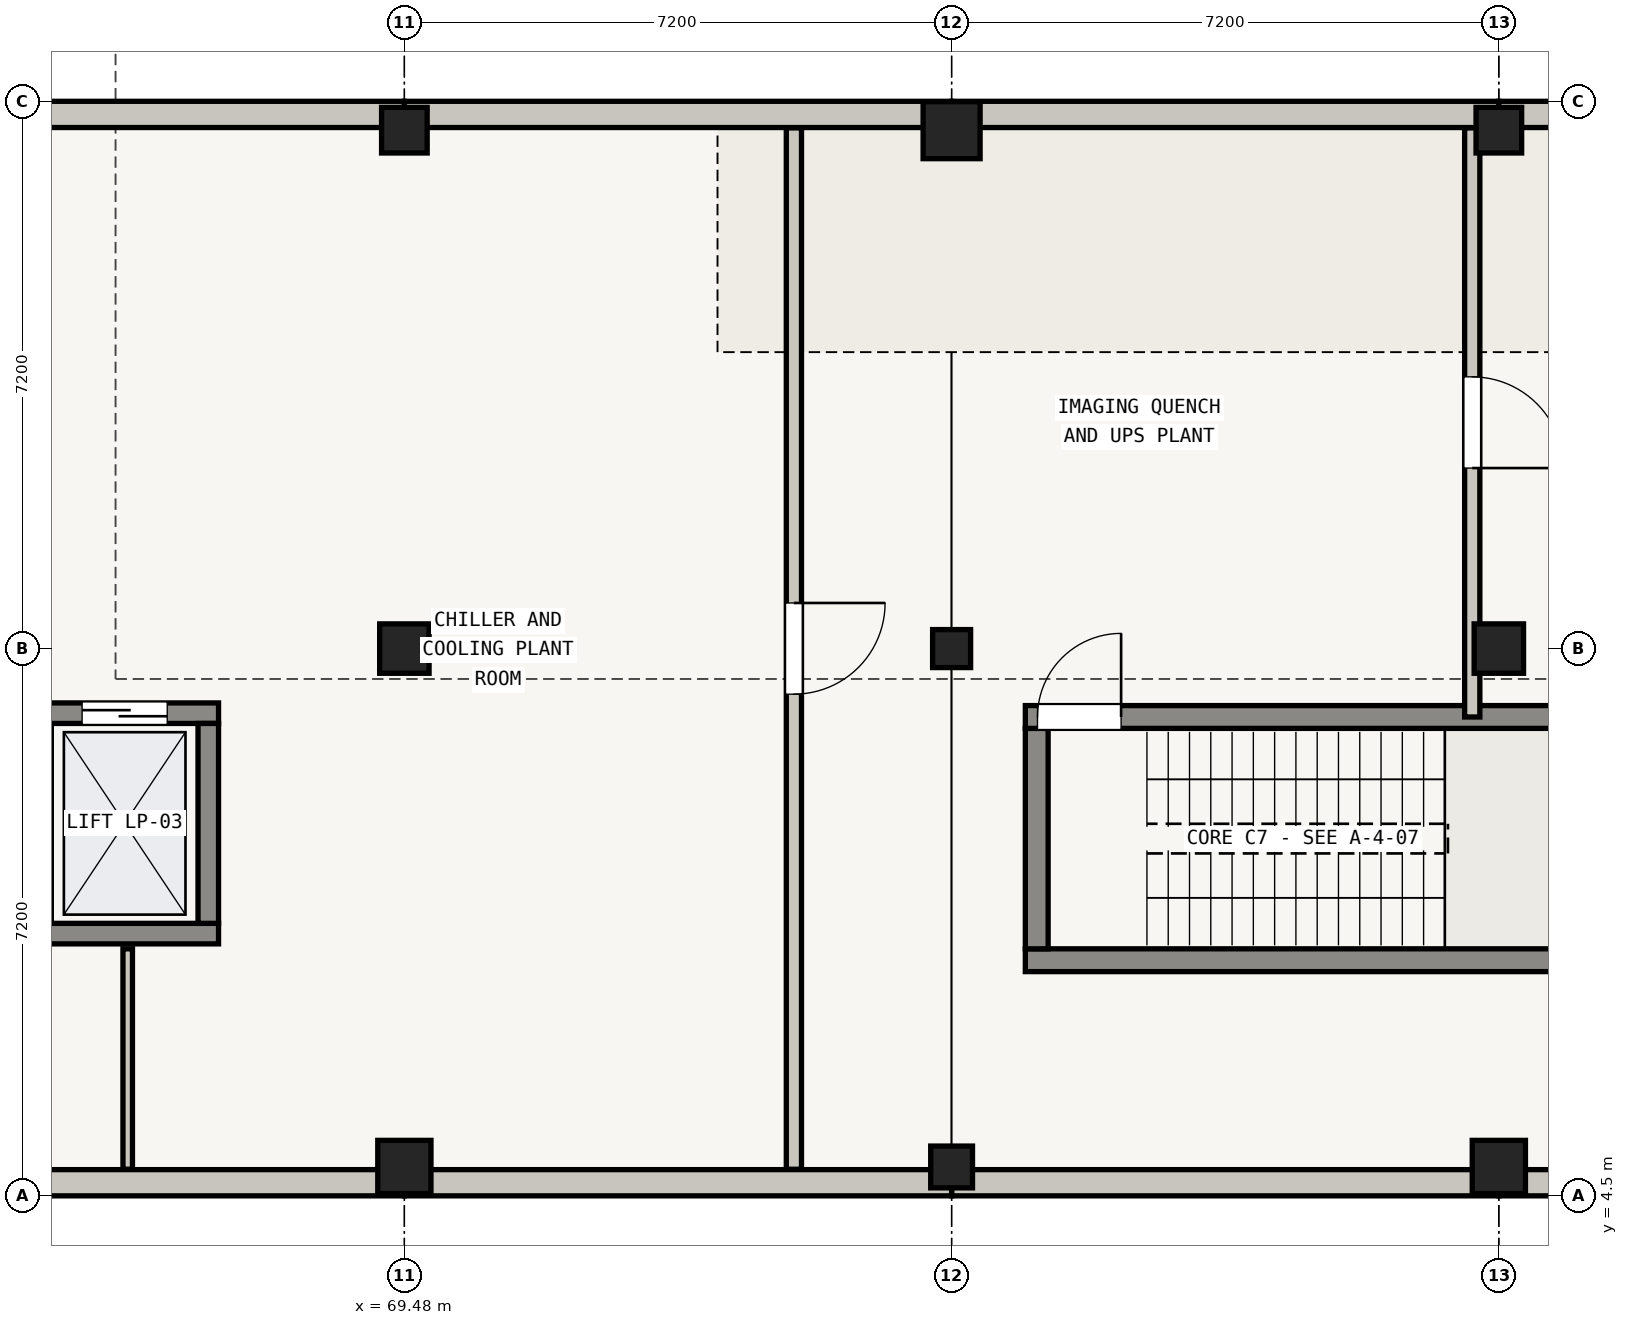
"""IFC4 building model, lengths in metres.
Left out: names, types, materials, properties, quantities, classifications, styles, units other than length and angle.
Written with IfcOpenShell. Run it as: python <this file> out.ifc"""

import sys

from ifc_helpers import new_model, si_unit, direction, frame, frame_2d, origin, origin_2d, place, context, subcontext, project, spatial, rectangle, extrude, element, fill, save


model = new_model("IFC4")
c1 = context("Model", 3, precision=1e-05, world=origin(), true_north=direction((0.0, 1.0)))
c2 = subcontext(c1, "Body", "Model", "MODEL_VIEW")
j1 = project(units=[si_unit("LENGTHUNIT", "METRE"), si_unit("PLANEANGLEUNIT", "RADIAN")], contexts=[c1])
p1 = place(None, origin())
s1 = spatial("IfcSite", under=j1, at=p1, CompositionType="ELEMENT")
p2 = place(p1, origin())
s2 = spatial("IfcBuilding", under=s1, at=p2, CompositionType="ELEMENT")
p3 = place(p2, frame((0.0, 0.0, -4.5)))
s3 = spatial("IfcBuildingStorey", under=s2, at=p3, CompositionType="ELEMENT", Elevation=-4.5)
p4 = place(p3, frame((69.48, 4.88, -0.42), z_axis=(0.0, 0.0, 1.0), x_axis=(1.0, 0.0, 0.0)))
e1 = element("IfcColumn", 1, at=p4, inside=s3, PredefinedType="COLUMN", context=c2, shape_type="SweptSolid", body=[
    extrude(rectangle(XDim=0.7, YDim=0.7, at=origin_2d()), origin(), (0.0, 0.0, 1.0), 4.605),
])
p5 = place(p3, frame((69.48, 11.7, -0.42), z_axis=(0.0, 0.0, 1.0), x_axis=(1.0, 0.0, 0.0)))
e2 = element("IfcColumn", 2, at=p5, inside=s3, PredefinedType="COLUMN", context=c2, shape_type="SweptSolid", body=[
    extrude(rectangle(XDim=0.65, YDim=0.65, at=origin_2d()), origin(), (0.0, 0.0, 1.0), 4.605),
])
p6 = place(p3, frame((69.48, 18.52, -0.42), z_axis=(0.0, 0.0, 1.0), x_axis=(1.0, 0.0, 0.0)))
e3 = element("IfcColumn", 3, at=p6, inside=s3, PredefinedType="COLUMN", context=c2, shape_type="SweptSolid", body=[
    extrude(rectangle(XDim=0.6, YDim=0.6, at=origin_2d()), origin(), (0.0, 0.0, 1.0), 4.605),
])
p7 = place(p3, frame((76.68, 4.88, -0.42), z_axis=(0.0, 0.0, 1.0), x_axis=(1.0, 0.0, 0.0)))
e4 = element("IfcColumn", 4, at=p7, inside=s3, PredefinedType="COLUMN", context=c2, shape_type="SweptSolid", body=[
    extrude(rectangle(XDim=0.55, YDim=0.55, at=origin_2d()), origin(), (0.0, 0.0, 1.0), 4.605),
])
p8 = place(p3, frame((76.68, 11.7, -0.42), z_axis=(0.0, 0.0, 1.0), x_axis=(1.0, 0.0, 0.0)))
e5 = element("IfcColumn", 5, at=p8, inside=s3, PredefinedType="COLUMN", context=c2, shape_type="SweptSolid", body=[
    extrude(rectangle(XDim=0.5, YDim=0.5, at=origin_2d()), origin(), (0.0, 0.0, 1.0), 4.605),
])
p9 = place(p3, frame((76.68, 18.52, -0.42), z_axis=(0.0, 0.0, 1.0), x_axis=(1.0, 0.0, 0.0)))
e6 = element("IfcColumn", 6, at=p9, inside=s3, PredefinedType="COLUMN", context=c2, shape_type="SweptSolid", body=[
    extrude(rectangle(XDim=0.75, YDim=0.75, at=origin_2d()), origin(), (0.0, 0.0, 1.0), 4.605),
])
p10 = place(p3, frame((83.88, 4.88, -0.42), z_axis=(0.0, 0.0, 1.0), x_axis=(1.0, 0.0, 0.0)))
e7 = element("IfcColumn", 7, at=p10, inside=s3, PredefinedType="COLUMN", context=c2, shape_type="SweptSolid", body=[
    extrude(rectangle(XDim=0.7, YDim=0.7, at=origin_2d()), origin(), (0.0, 0.0, 1.0), 4.605),
])
p11 = place(p3, frame((83.88, 11.7, -0.42), z_axis=(0.0, 0.0, 1.0), x_axis=(1.0, 0.0, 0.0)))
e8 = element("IfcColumn", 8, at=p11, inside=s3, PredefinedType="COLUMN", context=c2, shape_type="SweptSolid", body=[
    extrude(rectangle(XDim=0.65, YDim=0.65, at=origin_2d()), origin(), (0.0, 0.0, 1.0), 4.605),
])
p12 = place(p3, frame((83.88, 18.52, -0.42), z_axis=(0.0, 0.0, 1.0), x_axis=(1.0, 0.0, 0.0)))
e9 = element("IfcColumn", 9, at=p12, inside=s3, PredefinedType="COLUMN", context=c2, shape_type="SweptSolid", body=[
    extrude(rectangle(XDim=0.6, YDim=0.6, at=origin_2d()), origin(), (0.0, 0.0, 1.0), 4.605),
])
for number, where, z_axis, x_axis in (
    (10, (62.28, 18.728, -0.42), (0.0, 0.0, 1.0), (1.0, 0.0, 0.0)),
    (11, (69.48, 18.728, -0.42), (0.0, 0.0, 1.0), (1.0, 0.0, 0.0)),
    (12, (76.68, 18.728, -0.42), (0.0, 0.0, 1.0), (1.0, 0.0, 0.0)),
):
    element("IfcWall", number, at=place(p3, frame(where, z_axis=z_axis, x_axis=x_axis)), inside=s3, PredefinedType="SOLIDWALL", context=c2, shape_type="SweptSolid", body=[
        extrude(rectangle(XDim=7.2, YDim=0.345, at=frame_2d((3.6, 0.0))), origin(), (0.0, 0.0, 1.0), 3.97),
    ])
for number, where, z_axis, x_axis in (
    (13, (83.88, 18.728, -0.42), (0.0, 0.0, 1.0), (1.0, 0.0, 0.0)),
    (14, (91.08, 4.673, -0.42), (0.0, 0.0, 1.0), (-1.0, 0.0, 0.0)),
):
    element("IfcWall", number, at=place(p3, frame(where, z_axis=z_axis, x_axis=x_axis)), inside=s3, PredefinedType="SOLIDWALL", context=c2, shape_type="SweptSolid", body=[
        extrude(rectangle(XDim=7.2, YDim=0.345, at=frame_2d((3.6, 0.0))), origin(), (0.0, 0.0, 1.0), 3.99),
    ])
p13 = place(p3, frame((83.88, 4.673, -0.42), z_axis=(0.0, 0.0, 1.0), x_axis=(-1.0, 0.0, 0.0)))
e15 = element("IfcWall", 15, at=p13, inside=s3, PredefinedType="SOLIDWALL", context=c2, shape_type="SweptSolid", body=[
    extrude(rectangle(XDim=7.2, YDim=0.345, at=frame_2d((3.6, 0.0))), origin(), (0.0, 0.0, 1.0), 3.99),
])
for number, where, z_axis, x_axis in (
    (16, (76.68, 4.673, -0.42), (0.0, 0.0, 1.0), (-1.0, 0.0, 0.0)),
    (17, (69.48, 4.673, -0.42), (0.0, 0.0, 1.0), (-1.0, 0.0, 0.0)),
):
    element("IfcWall", number, at=place(p3, frame(where, z_axis=z_axis, x_axis=x_axis)), inside=s3, PredefinedType="SOLIDWALL", context=c2, shape_type="SweptSolid", body=[
        extrude(rectangle(XDim=7.2, YDim=0.345, at=frame_2d((3.6, 0.0))), origin(), (0.0, 0.0, 1.0), 3.97),
    ])
p14 = place(p3, frame((67.035, 7.95, 0.0), z_axis=(0.0, 0.0, 1.0), x_axis=(-1.0, 0.0, 0.0)))
e18 = element("IfcWall", 18, at=p14, inside=s3, PredefinedType="SHEAR", context=c2, shape_type="SweptSolid", body=[
    extrude(rectangle(XDim=2.47, YDim=0.27, at=frame_2d((1.235, 0.0))), origin(), (0.0, 0.0, 1.0), 4.185),
])
p15 = place(p3, frame((64.565, 10.85, 0.0), z_axis=(0.0, 0.0, 1.0), x_axis=(1.0, 0.0, 0.0)))
e19 = element("IfcWall", 19, at=p15, inside=s3, PredefinedType="SHEAR", context=c2, shape_type="SweptSolid", body=[
    extrude(rectangle(XDim=2.47, YDim=0.27, at=frame_2d((1.235, 0.0))), origin(), (0.0, 0.0, 1.0), 4.185),
])
p16 = place(p15, frame((0.675, 0.0, 0.0)))
e20 = element("IfcOpeningElement", 20, at=p16, cuts=e19, PredefinedType="OPENING", context=c2, shape_type="SweptSolid", body=[
    extrude(rectangle(XDim=1.12, YDim=2.1, at=frame_2d((0.56, 1.05))), frame((0.0, 0.135, 0.0), z_axis=(0.0, -1.0, 0.0), x_axis=(1.0, 0.0, 0.0)), (0.0, 0.0, 1.0), 0.27),
])
p17 = place(p3, frame((66.9, 10.715, 0.0), z_axis=(0.0, 0.0, 1.0), x_axis=(0.0, -1.0, 0.0)))
e21 = element("IfcWall", 21, at=p17, inside=s3, PredefinedType="SHEAR", context=c2, shape_type="SweptSolid", body=[
    extrude(rectangle(XDim=2.63, YDim=0.27, at=frame_2d((1.315, 0.0))), origin(), (0.0, 0.0, 1.0), 4.185),
])
p18 = place(p3, frame((84.95, 7.6, 0.0), z_axis=(0.0, 0.0, 1.0), x_axis=(-1.0, 0.0, 0.0)))
e22 = element("IfcWall", 22, at=p18, inside=s3, PredefinedType="SHEAR", context=c2, shape_type="SweptSolid", body=[
    extrude(rectangle(XDim=7.3, YDim=0.3, at=frame_2d((3.65, 0.0))), origin(), (0.0, 0.0, 1.0), 4.185),
])
p19 = place(p3, frame((77.8, 7.75, 0.0), z_axis=(0.0, 0.0, 1.0), x_axis=(0.0, 1.0, 0.0)))
e23 = element("IfcWall", 23, at=p19, inside=s3, PredefinedType="SHEAR", context=c2, shape_type="SweptSolid", body=[
    extrude(rectangle(XDim=2.9, YDim=0.3, at=frame_2d((1.45, 0.0))), origin(), (0.0, 0.0, 1.0), 4.185),
])
p20 = place(p3, frame((77.65, 10.8, 0.0), z_axis=(0.0, 0.0, 1.0), x_axis=(1.0, 0.0, 0.0)))
e24 = element("IfcWall", 24, at=p20, inside=s3, PredefinedType="SHEAR", context=c2, shape_type="SweptSolid", body=[
    extrude(rectangle(XDim=7.3, YDim=0.3, at=frame_2d((3.65, 0.0))), origin(), (0.0, 0.0, 1.0), 4.185),
])
p21 = place(p20, frame((0.16, 0.0, 0.0)))
e25 = element("IfcOpeningElement", 25, at=p21, cuts=e24, PredefinedType="OPENING", context=c2, shape_type="SweptSolid", body=[
    extrude(rectangle(XDim=1.1, YDim=2.05, at=frame_2d((0.55, 1.025))), frame((0.0, 0.15, 0.0), z_axis=(0.0, -1.0, 0.0), x_axis=(1.0, 0.0, 0.0)), (0.0, 0.0, 1.0), 0.3),
])
p22 = place(p3, frame((74.605, 18.55, 0.0), z_axis=(0.0, 0.0, 1.0), x_axis=(0.0, -1.0, 0.0)))
e26 = element("IfcWall", 26, at=p22, inside=s3, PredefinedType="SOLIDWALL", context=c2, shape_type="SweptSolid", body=[
    extrude(rectangle(XDim=13.7, YDim=0.2, at=frame_2d((6.85, 0.0))), origin(), (0.0, 0.0, 1.0), 3.205),
])
p23 = place(p22, frame((6.25, 0.0, 0.0)))
e27 = element("IfcOpeningElement", 27, at=p23, cuts=e26, PredefinedType="OPENING", context=c2, shape_type="SweptSolid", body=[
    extrude(rectangle(XDim=1.2, YDim=2.05, at=frame_2d((0.6, 1.025))), frame((0.0, 0.1, 0.0), z_axis=(0.0, -1.0, 0.0), x_axis=(1.0, 0.0, 0.0)), (0.0, 0.0, 1.0), 0.2),
])
p24 = place(p3, frame((65.84, 4.85, 0.0), z_axis=(0.0, 0.0, 1.0), x_axis=(0.0, 1.0, 0.0)))
e28 = element("IfcWall", 28, at=p24, inside=s3, PredefinedType="PARTITIONING", context=c2, shape_type="SweptSolid", body=[
    extrude(rectangle(XDim=2.9, YDim=0.125, at=frame_2d((1.45, 0.0))), origin(), (0.0, 0.0, 1.0), 3.205),
])
p25 = place(p3, frame((83.53, 18.55, 0.0), z_axis=(0.0, 0.0, 1.0), x_axis=(0.0, -1.0, 0.0)))
e29 = element("IfcWall", 29, at=p25, inside=s3, PredefinedType="SOLIDWALL", context=c2, shape_type="SweptSolid", body=[
    extrude(rectangle(XDim=7.75, YDim=0.2, at=frame_2d((3.875, 0.0))), origin(), (0.0, 0.0, 1.0), 3.205),
])
p26 = place(p25, frame((3.275, 0.0, 0.0)))
e30 = element("IfcOpeningElement", 30, at=p26, cuts=e29, PredefinedType="OPENING", context=c2, shape_type="SweptSolid", body=[
    extrude(rectangle(XDim=1.2, YDim=2.05, at=frame_2d((0.6, 1.025))), frame((0.0, 0.1, 0.0), z_axis=(0.0, -1.0, 0.0), x_axis=(1.0, 0.0, 0.0)), (0.0, 0.0, 1.0), 0.2),
])
p27 = place(p16, origin())
e31 = element("IfcDoor", 31, at=p27, inside=s3, OperationType="DOUBLE_DOOR_SLIDING", PredefinedType="DOOR", context=c2, shape_type="SweptSolid", body=[
    extrude(rectangle(XDim=1.12, YDim=2.1, at=frame_2d((0.56, 1.05))), frame((0.0, 0.025, 0.0), z_axis=(0.0, -1.0, 0.0), x_axis=(1.0, 0.0, 0.0)), (0.0, 0.0, 1.0), 0.05),
])
fill(e20, e31)
p28 = place(p21, origin())
e32 = element("IfcDoor", 32, at=p28, inside=s3, OperationType="SINGLE_SWING_RIGHT", PredefinedType="DOOR", context=c2, shape_type="SweptSolid", body=[
    extrude(rectangle(XDim=1.1, YDim=2.05, at=frame_2d((0.55, 1.025))), frame((0.0, 0.025, 0.0), z_axis=(0.0, -1.0, 0.0), x_axis=(1.0, 0.0, 0.0)), (0.0, 0.0, 1.0), 0.05),
])
fill(e25, e32)
p29 = place(p23, origin())
e33 = element("IfcDoor", 33, at=p29, inside=s3, OperationType="SINGLE_SWING_LEFT", PredefinedType="DOOR", context=c2, shape_type="SweptSolid", body=[
    extrude(rectangle(XDim=1.2, YDim=2.05, at=frame_2d((0.6, 1.025))), frame((0.0, 0.025, 0.0), z_axis=(0.0, -1.0, 0.0), x_axis=(1.0, 0.0, 0.0)), (0.0, 0.0, 1.0), 0.05),
])
fill(e27, e33)
p30 = place(p26, origin())
e34 = element("IfcDoor", 34, at=p30, inside=s3, OperationType="SINGLE_SWING_RIGHT", PredefinedType="DOOR", context=c2, shape_type="SweptSolid", body=[
    extrude(rectangle(XDim=1.2, YDim=2.05, at=frame_2d((0.6, 1.025))), frame((0.0, 0.025, 0.0), z_axis=(0.0, -1.0, 0.0), x_axis=(1.0, 0.0, 0.0)), (0.0, 0.0, 1.0), 0.05),
])
fill(e30, e34)
save(model, sys.argv[1])
